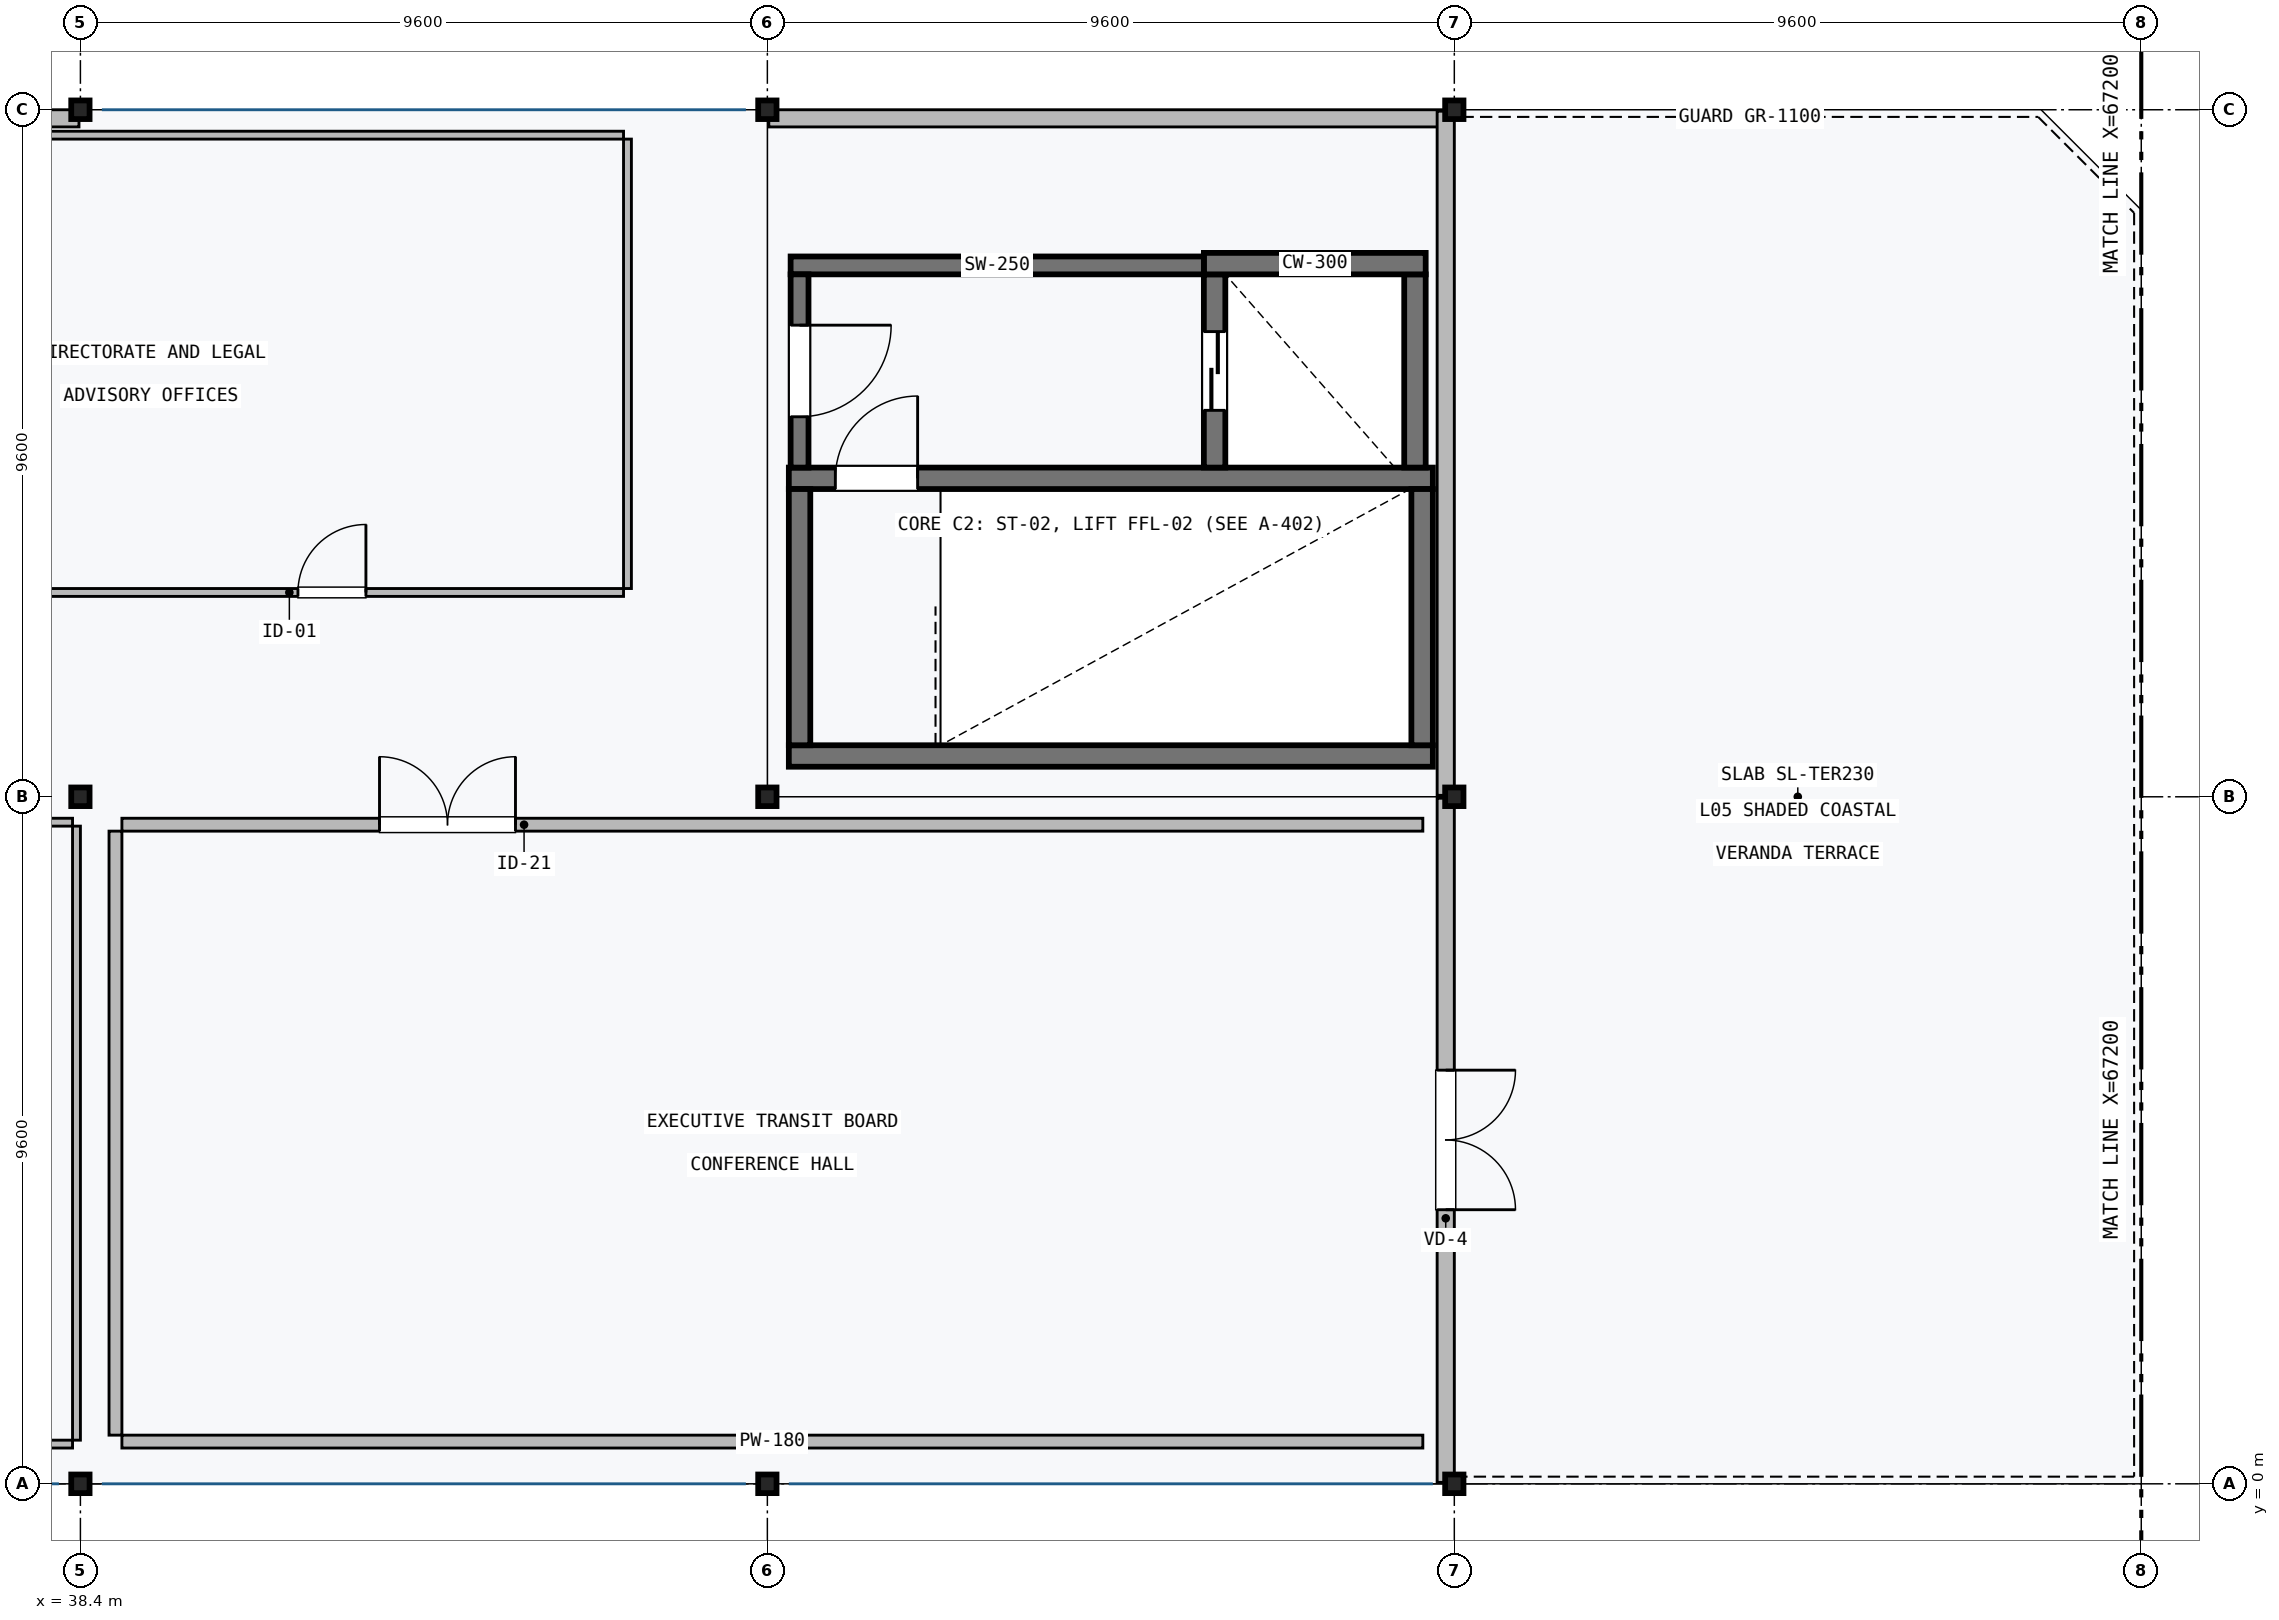
"""IFC4 building model, lengths in metres.
Left out: names, types, materials, properties, quantities, classifications, styles, units other than length and angle.
Written with IfcOpenShell. Run it as: python <this file> out.ifc"""

import sys

from ifc_helpers import new_model, si_unit, direction, frame, frame_2d, origin, origin_2d, place, context, subcontext, project, spatial, rectangle, i_section, extrude, element, fill, save


model = new_model("IFC4")
c1 = context("Model", 3, precision=1e-05, world=origin(), true_north=direction((0.0, 1.0)))
c2 = subcontext(c1, "Body", "Model", "MODEL_VIEW")
j1 = project(units=[si_unit("LENGTHUNIT", "METRE"), si_unit("PLANEANGLEUNIT", "RADIAN")], contexts=[c1])
p1 = place(None, origin())
s1 = spatial("IfcSite", under=j1, at=p1, CompositionType="ELEMENT")
p2 = place(p1, origin())
s2 = spatial("IfcBuilding", under=s1, at=p2, CompositionType="ELEMENT")
p3 = place(p2, frame((0.0, 0.0, 23.1)))
s3 = spatial("IfcBuildingStorey", under=s2, at=p3, CompositionType="ELEMENT", Elevation=23.1)
for number, where, z_axis, x_axis in (
    (1, (38.4, 0.0, 0.0), (0.0, 0.0, 1.0), (1.0, 0.0, 0.0)),
    (2, (38.4, 9.6, 0.0), (0.0, 0.0, 1.0), (1.0, 0.0, 0.0)),
    (3, (38.4, 19.2, 0.0), (0.0, 0.0, 1.0), (1.0, 0.0, 0.0)),
    (4, (48.0, 0.0, 0.0), (0.0, 0.0, 1.0), (1.0, 0.0, 0.0)),
    (5, (48.0, 9.6, 0.0), (0.0, 0.0, 1.0), (1.0, 0.0, 0.0)),
    (6, (48.0, 19.2, 0.0), (0.0, 0.0, 1.0), (1.0, 0.0, 0.0)),
    (7, (57.6, 0.0, 0.0), (0.0, 0.0, 1.0), (1.0, 0.0, 0.0)),
    (8, (57.6, 9.6, 0.0), (0.0, 0.0, 1.0), (1.0, 0.0, 0.0)),
    (9, (57.6, 19.2, 0.0), (0.0, 0.0, 1.0), (1.0, 0.0, 0.0)),
):
    element("IfcColumn", number, at=place(p3, frame(where, z_axis=z_axis, x_axis=x_axis)), inside=s3, PredefinedType="COLUMN", context=c2, shape_type="SweptSolid", body=[
        extrude(i_section(OverallWidth=0.256, OverallDepth=0.26, WebThickness=0.01, FlangeThickness=0.017, FilletRadius=0.013, at=origin_2d()), origin(), (0.0, 0.0, 1.0), 3.92),
    ])
p4 = place(p3, frame((48.3, 10.17, 0.0), z_axis=(0.0, 0.0, 1.0), x_axis=(1.0, 0.0, 0.0)))
e10 = element("IfcWall", 10, at=p4, inside=s3, PredefinedType="SHEAR", context=c2, shape_type="SweptSolid", body=[
    extrude(rectangle(XDim=9.0, YDim=0.3, at=frame_2d((4.5, 0.0))), origin(), (0.0, 0.0, 1.0), 3.92),
])
p5 = place(p3, frame((57.3, 14.05, 0.0), z_axis=(0.0, 0.0, 1.0), x_axis=(-1.0, 0.0, 0.0)))
e11 = element("IfcWall", 11, at=p5, inside=s3, PredefinedType="SHEAR", context=c2, shape_type="SweptSolid", body=[
    extrude(rectangle(XDim=9.0, YDim=0.3, at=frame_2d((4.5, 0.0))), origin(), (0.0, 0.0, 1.0), 4.2),
])
p6 = place(p5, frame((7.2, 0.0, 0.0)))
e12 = element("IfcOpeningElement", 12, at=p6, cuts=e11, PredefinedType="OPENING", context=c2, shape_type="SweptSolid", body=[
    extrude(rectangle(XDim=1.15, YDim=2.15, at=frame_2d((0.575, 1.075))), frame((0.0, 0.16, 0.0), z_axis=(0.0, -1.0, 0.0), x_axis=(1.0, 0.0, 0.0)), (0.0, 0.0, 1.0), 0.32),
])
for number, where, z_axis, x_axis in (
    (13, (48.45, 10.32, 0.0), (0.0, 0.0, 1.0), (0.0, 1.0, 0.0)),
    (14, (57.15, 13.9, 0.0), (0.0, 0.0, 1.0), (0.0, -1.0, 0.0)),
):
    element("IfcWall", number, at=place(p3, frame(where, z_axis=z_axis, x_axis=x_axis)), inside=s3, PredefinedType="SHEAR", context=c2, shape_type="SweptSolid", body=[
        extrude(rectangle(XDim=3.58, YDim=0.3, at=frame_2d((1.79, 0.0))), origin(), (0.0, 0.0, 1.0), 3.92),
    ])
p7 = place(p3, frame((54.25, 16.9, 0.0), z_axis=(0.0, 0.0, 1.0), x_axis=(0.0, -1.0, 0.0)))
e15 = element("IfcWall", 15, at=p7, inside=s3, PredefinedType="SHEAR", context=c2, shape_type="SweptSolid", body=[
    extrude(rectangle(XDim=2.7, YDim=0.3, at=frame_2d((1.35, 0.0))), origin(), (0.0, 0.0, 1.0), 4.2),
])
p8 = place(p7, frame((0.8, 0.0, 0.0)))
e16 = element("IfcOpeningElement", 16, at=p8, cuts=e15, PredefinedType="OPENING", context=c2, shape_type="SweptSolid", body=[
    extrude(rectangle(XDim=1.1, YDim=2.1, at=frame_2d((0.55, 1.05))), frame((0.0, 0.16, 0.0), z_axis=(0.0, -1.0, 0.0), x_axis=(1.0, 0.0, 0.0)), (0.0, 0.0, 1.0), 0.32),
])
p9 = place(p3, frame((57.05, 14.2, 0.0), z_axis=(0.0, 0.0, 1.0), x_axis=(0.0, 1.0, 0.0)))
e17 = element("IfcWall", 17, at=p9, inside=s3, PredefinedType="SHEAR", context=c2, shape_type="SweptSolid", body=[
    extrude(rectangle(XDim=2.7, YDim=0.3, at=frame_2d((1.35, 0.0))), origin(), (0.0, 0.0, 1.0), 4.2),
])
p10 = place(p3, frame((54.1, 17.05, 0.0), z_axis=(0.0, 0.0, 1.0), x_axis=(1.0, 0.0, 0.0)))
e18 = element("IfcWall", 18, at=p10, inside=s3, PredefinedType="SHEAR", context=c2, shape_type="SweptSolid", body=[
    extrude(rectangle(XDim=3.1, YDim=0.3, at=frame_2d((1.55, 0.0))), origin(), (0.0, 0.0, 1.0), 4.2),
])
p11 = place(p3, frame((54.1, 17.025, 0.0), z_axis=(0.0, 0.0, 1.0), x_axis=(-1.0, 0.0, 0.0)))
e19 = element("IfcWall", 19, at=p11, inside=s3, PredefinedType="SHEAR", context=c2, shape_type="SweptSolid", body=[
    extrude(rectangle(XDim=5.775, YDim=0.25, at=frame_2d((2.888, 0.0))), origin(), (0.0, 0.0, 1.0), 3.92),
])
p12 = place(p3, frame((48.45, 14.2, 0.0), z_axis=(0.0, 0.0, 1.0), x_axis=(0.0, 1.0, 0.0)))
e20 = element("IfcWall", 20, at=p12, inside=s3, PredefinedType="SHEAR", context=c2, shape_type="SweptSolid", body=[
    extrude(rectangle(XDim=2.7, YDim=0.25, at=frame_2d((1.35, 0.0))), origin(), (0.0, 0.0, 1.0), 3.92),
])
p13 = place(p12, frame((0.71, 0.0, 0.0)))
e21 = element("IfcOpeningElement", 21, at=p13, cuts=e20, PredefinedType="OPENING", context=c2, shape_type="SweptSolid", body=[
    extrude(rectangle(XDim=1.28, YDim=2.2, at=frame_2d((0.64, 1.1))), frame((0.0, 0.135, 0.0), z_axis=(0.0, -1.0, 0.0), x_axis=(1.0, 0.0, 0.0)), (0.0, 0.0, 1.0), 0.27),
])
p14 = place(p3, frame((28.82, 19.08, 0.0), z_axis=(0.0, 0.0, 1.0), x_axis=(1.0, 0.0, 0.0)))
e22 = element("IfcWall", 22, at=p14, inside=s3, PredefinedType="SOLIDWALL", context=c2, shape_type="SweptSolid", body=[
    extrude(rectangle(XDim=9.56, YDim=0.24, at=frame_2d((4.78, 0.0))), origin(), (0.0, 0.0, 1.0), 3.63),
])
p15 = place(p14, frame((4.18, 0.0, 0.9)))
e23 = element("IfcOpeningElement", 23, at=p15, cuts=e22, PredefinedType="OPENING", context=c2, shape_type="SweptSolid", body=[
    extrude(rectangle(XDim=1.2, YDim=1.8, at=frame_2d((0.6, 0.9))), frame((0.0, 0.13, 0.0), z_axis=(0.0, -1.0, 0.0), x_axis=(1.0, 0.0, 0.0)), (0.0, 0.0, 1.0), 0.26),
])
p16 = place(p3, frame((57.48, 9.58, 0.0), z_axis=(0.0, 0.0, 1.0), x_axis=(0.0, -1.0, 0.0)))
e24 = element("IfcWall", 24, at=p16, inside=s3, PredefinedType="SOLIDWALL", context=c2, shape_type="SweptSolid", body=[
    extrude(rectangle(XDim=9.56, YDim=0.24, at=frame_2d((4.78, 0.0))), origin(), (0.0, 0.0, 1.0), 3.463),
])
p17 = place(p16, frame((3.8, 0.0, 0.0)))
e25 = element("IfcOpeningElement", 25, at=p17, cuts=e24, PredefinedType="OPENING", context=c2, shape_type="SweptSolid", body=[
    extrude(rectangle(XDim=1.95, YDim=2.25, at=frame_2d((0.975, 1.125))), frame((0.0, 0.13, 0.0), z_axis=(0.0, -1.0, 0.0), x_axis=(1.0, 0.0, 0.0)), (0.0, 0.0, 1.0), 0.26),
])
p18 = place(p3, frame((48.02, 19.08, 0.0), z_axis=(0.0, 0.0, 1.0), x_axis=(1.0, 0.0, 0.0)))
e26 = element("IfcWall", 26, at=p18, inside=s3, PredefinedType="SOLIDWALL", context=c2, shape_type="SweptSolid", body=[
    extrude(rectangle(XDim=9.56, YDim=0.24, at=frame_2d((4.78, 0.0))), origin(), (0.0, 0.0, 1.0), 3.63),
])
p19 = place(p3, frame((57.48, 19.18, 0.0), z_axis=(0.0, 0.0, 1.0), x_axis=(0.0, -1.0, 0.0)))
e27 = element("IfcWall", 27, at=p19, inside=s3, PredefinedType="SOLIDWALL", context=c2, shape_type="SweptSolid", body=[
    extrude(rectangle(XDim=9.56, YDim=0.24, at=frame_2d((4.78, 0.0))), origin(), (0.0, 0.0, 1.0), 3.463),
])
p20 = place(p3, frame((57.16, 0.59, 0.0), z_axis=(0.0, 0.0, 1.0), x_axis=(-1.0, 0.0, 0.0)))
e28 = element("IfcWall", 28, at=p20, inside=s3, PredefinedType="PARTITIONING", context=c2, shape_type="SweptSolid", body=[
    extrude(rectangle(XDim=18.18, YDim=0.18, at=frame_2d((9.09, 0.0))), origin(), (0.0, 0.0, 1.0), 3.453),
])
p21 = place(p3, frame((38.98, 9.21, 0.0), z_axis=(0.0, 0.0, 1.0), x_axis=(1.0, 0.0, 0.0)))
e29 = element("IfcWall", 29, at=p21, inside=s3, PredefinedType="PARTITIONING", context=c2, shape_type="SweptSolid", body=[
    extrude(rectangle(XDim=18.18, YDim=0.18, at=frame_2d((9.09, 0.0))), origin(), (0.0, 0.0, 1.0), 3.453),
])
p22 = place(p21, frame((3.6, 0.0, 0.0)))
e30 = element("IfcOpeningElement", 30, at=p22, cuts=e29, PredefinedType="OPENING", context=c2, shape_type="SweptSolid", body=[
    extrude(rectangle(XDim=1.9, YDim=2.35, at=frame_2d((0.95, 1.175))), frame((0.0, 0.1, 0.0), z_axis=(0.0, -1.0, 0.0), x_axis=(1.0, 0.0, 0.0)), (0.0, 0.0, 1.0), 0.2),
])
p23 = place(p3, frame((38.89, 0.68, 0.0), z_axis=(0.0, 0.0, 1.0), x_axis=(0.0, 1.0, 0.0)))
e31 = element("IfcWall", 31, at=p23, inside=s3, PredefinedType="PARTITIONING", context=c2, shape_type="SweptSolid", body=[
    extrude(rectangle(XDim=8.44, YDim=0.18, at=frame_2d((4.22, 0.0))), origin(), (0.0, 0.0, 1.0), 3.56),
])
p24 = place(p3, frame((38.29, 0.555, 0.0), z_axis=(0.0, 0.0, 1.0), x_axis=(-1.0, 0.0, 0.0)))
e32 = element("IfcWall", 32, at=p24, inside=s3, PredefinedType="PARTITIONING", context=c2, shape_type="SweptSolid", body=[
    extrude(rectangle(XDim=8.98, YDim=0.11, at=frame_2d((4.49, 0.0))), origin(), (0.0, 0.0, 1.0), 3.453),
])
p25 = place(p3, frame((29.31, 9.245, 0.0), z_axis=(0.0, 0.0, 1.0), x_axis=(1.0, 0.0, 0.0)))
e33 = element("IfcWall", 33, at=p25, inside=s3, PredefinedType="PARTITIONING", context=c2, shape_type="SweptSolid", body=[
    extrude(rectangle(XDim=8.98, YDim=0.11, at=frame_2d((4.49, 0.0))), origin(), (0.0, 0.0, 1.0), 3.453),
])
p26 = place(p25, frame((4.03, 0.0, 0.0)))
e34 = element("IfcOpeningElement", 34, at=p26, cuts=e33, PredefinedType="OPENING", context=c2, shape_type="SweptSolid", body=[
    extrude(rectangle(XDim=0.92, YDim=2.15, at=frame_2d((0.46, 1.075))), frame((0.0, 0.065, 0.0), z_axis=(0.0, -1.0, 0.0), x_axis=(1.0, 0.0, 0.0)), (0.0, 0.0, 1.0), 0.13),
])
p27 = place(p3, frame((38.345, 9.19, 0.0), z_axis=(0.0, 0.0, 1.0), x_axis=(0.0, -1.0, 0.0)))
e35 = element("IfcWall", 35, at=p27, inside=s3, PredefinedType="PARTITIONING", context=c2, shape_type="SweptSolid", body=[
    extrude(rectangle(XDim=8.58, YDim=0.11, at=frame_2d((4.29, 0.0))), origin(), (0.0, 0.0, 1.0), 3.453),
])
p28 = place(p3, frame((45.99, 12.455, 0.0), z_axis=(0.0, 0.0, 1.0), x_axis=(-1.0, 0.0, 0.0)))
e36 = element("IfcWall", 36, at=p28, inside=s3, PredefinedType="PARTITIONING", context=c2, shape_type="SweptSolid", body=[
    extrude(rectangle(XDim=16.68, YDim=0.11, at=frame_2d((8.34, 0.0))), origin(), (0.0, 0.0, 1.0), 3.453),
])
p29 = place(p28, frame((3.6, 0.0, 0.0)))
e37 = element("IfcOpeningElement", 37, at=p29, cuts=e36, PredefinedType="OPENING", context=c2, shape_type="SweptSolid", body=[
    extrude(rectangle(XDim=0.95, YDim=2.15, at=frame_2d((0.475, 1.075))), frame((0.0, 0.065, 0.0), z_axis=(0.0, -1.0, 0.0), x_axis=(1.0, 0.0, 0.0)), (0.0, 0.0, 1.0), 0.13),
])
p30 = place(p3, frame((29.31, 18.845, 0.0), z_axis=(0.0, 0.0, 1.0), x_axis=(1.0, 0.0, 0.0)))
e38 = element("IfcWall", 38, at=p30, inside=s3, PredefinedType="PARTITIONING", context=c2, shape_type="SweptSolid", body=[
    extrude(rectangle(XDim=16.68, YDim=0.11, at=frame_2d((8.34, 0.0))), origin(), (0.0, 0.0, 1.0), 3.453),
])
p31 = place(p3, frame((46.045, 18.79, 0.0), z_axis=(0.0, 0.0, 1.0), x_axis=(0.0, -1.0, 0.0)))
e39 = element("IfcWall", 39, at=p31, inside=s3, PredefinedType="PARTITIONING", context=c2, shape_type="SweptSolid", body=[
    extrude(rectangle(XDim=6.28, YDim=0.11, at=frame_2d((3.14, 0.0))), origin(), (0.0, 0.0, 1.0), 3.56),
])
p32 = place(p6, frame((1.15, 0.0, 0.0), z_axis=(0.0, 0.0, 1.0), x_axis=(-1.0, 0.0, 0.0)))
e40 = element("IfcDoor", 40, at=p32, inside=s3, OperationType="SINGLE_SWING_LEFT", PredefinedType="DOOR", context=c2, shape_type="SweptSolid", body=[
    extrude(rectangle(XDim=1.15, YDim=2.15, at=frame_2d((0.575, 1.075))), frame((0.0, 0.025, 0.0), z_axis=(0.0, -1.0, 0.0), x_axis=(1.0, 0.0, 0.0)), (0.0, 0.0, 1.0), 0.05),
])
fill(e12, e40)
p33 = place(p8, frame((1.1, 0.0, 0.0), z_axis=(0.0, 0.0, 1.0), x_axis=(-1.0, 0.0, 0.0)))
e41 = element("IfcDoor", 41, at=p33, inside=s3, OperationType="DOUBLE_DOOR_SLIDING", PredefinedType="DOOR", context=c2, shape_type="SweptSolid", body=[
    extrude(rectangle(XDim=1.1, YDim=2.1, at=frame_2d((0.55, 1.05))), frame((0.0, 0.025, 0.0), z_axis=(0.0, -1.0, 0.0), x_axis=(1.0, 0.0, 0.0)), (0.0, 0.0, 1.0), 0.05),
])
fill(e16, e41)
p34 = place(p13, frame((1.28, 0.0, 0.0), z_axis=(0.0, 0.0, 1.0), x_axis=(-1.0, 0.0, 0.0)))
e42 = element("IfcDoor", 42, at=p34, inside=s3, OperationType="SINGLE_SWING_RIGHT", PredefinedType="DOOR", context=c2, shape_type="SweptSolid", body=[
    extrude(rectangle(XDim=1.28, YDim=2.2, at=frame_2d((0.64, 1.1))), frame((0.0, 0.025, 0.0), z_axis=(0.0, -1.0, 0.0), x_axis=(1.0, 0.0, 0.0)), (0.0, 0.0, 1.0), 0.05),
])
fill(e21, e42)
p35 = place(p17, origin())
e43 = element("IfcDoor", 43, at=p35, inside=s3, OperationType="DOUBLE_DOOR_SINGLE_SWING", PredefinedType="DOOR", context=c2, shape_type="SweptSolid", body=[
    extrude(rectangle(XDim=1.95, YDim=2.25, at=frame_2d((0.975, 1.125))), frame((0.0, 0.025, 0.0), z_axis=(0.0, -1.0, 0.0), x_axis=(1.0, 0.0, 0.0)), (0.0, 0.0, 1.0), 0.05),
])
fill(e25, e43)
p36 = place(p22, origin())
e44 = element("IfcDoor", 44, at=p36, inside=s3, OperationType="DOUBLE_DOOR_SINGLE_SWING", PredefinedType="DOOR", context=c2, shape_type="SweptSolid", body=[
    extrude(rectangle(XDim=1.9, YDim=2.35, at=frame_2d((0.95, 1.175))), frame((0.0, 0.025, 0.0), z_axis=(0.0, -1.0, 0.0), x_axis=(1.0, 0.0, 0.0)), (0.0, 0.0, 1.0), 0.05),
])
fill(e30, e44)
p37 = place(p29, frame((0.95, 0.0, 0.0), z_axis=(0.0, 0.0, 1.0), x_axis=(-1.0, 0.0, 0.0)))
e45 = element("IfcDoor", 45, at=p37, inside=s3, OperationType="SINGLE_SWING_LEFT", PredefinedType="DOOR", context=c2, shape_type="SweptSolid", body=[
    extrude(rectangle(XDim=0.95, YDim=2.15, at=frame_2d((0.475, 1.075))), frame((0.0, 0.025, 0.0), z_axis=(0.0, -1.0, 0.0), x_axis=(1.0, 0.0, 0.0)), (0.0, 0.0, 1.0), 0.05),
])
fill(e37, e45)
save(model, sys.argv[1])
